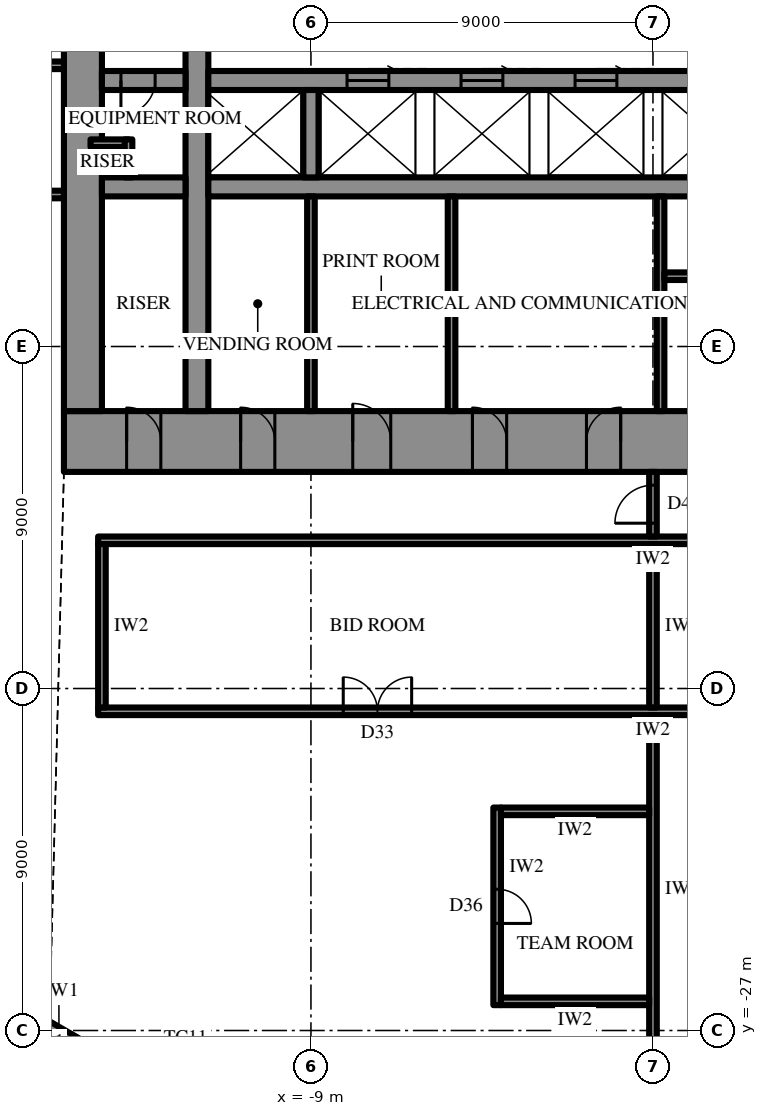
"""IFC4 building model, lengths in metres.
Left out: names, types, materials, properties, quantities, classifications, styles, units other than length and angle.
Written with IfcOpenShell. Run it as: python <this file> out.ifc"""

import sys

from ifc_helpers import new_model, si_unit, direction, frame, frame_2d, origin, place, context, subcontext, project, spatial, rectangle, extrude, element, fill, save


model = new_model("IFC4")
c1 = context("Model", 3, precision=1e-05, world=origin(), true_north=direction((0.0, 1.0)))
c2 = subcontext(c1, "Body", "Model", "MODEL_VIEW")
j1 = project(units=[si_unit("LENGTHUNIT", "METRE"), si_unit("PLANEANGLEUNIT", "RADIAN")], contexts=[c1])
p1 = place(None, origin())
s1 = spatial("IfcSite", under=j1, at=p1, CompositionType="ELEMENT")
p2 = place(p1, origin())
s2 = spatial("IfcBuilding", under=s1, at=p2, CompositionType="ELEMENT")
p3 = place(p2, frame((0.0, 0.0, 261.7)))
s3 = spatial("IfcBuildingStorey", under=s2, at=p3, CompositionType="ELEMENT", Elevation=261.7)
p4 = place(p3, frame((15.5, -11.5, 0.0), z_axis=(0.0, 0.0, 1.0), x_axis=(-1.0, 0.0, 0.0)))
e1 = element("IfcWall", 1, at=p4, inside=s3, PredefinedType="SHEAR", context=c2, shape_type="SweptSolid", body=[
    extrude(rectangle(XDim=31.0, YDim=1.6, at=frame_2d((15.5, 0.0))), origin(), (0.0, 0.0, 1.0), 4.2),
])
p5 = place(p4, frame((16.35, 0.0, 0.0)))
e2 = element("IfcOpeningElement", 2, at=p5, cuts=e1, PredefinedType="OPENING", context=c2, shape_type="SweptSolid", body=[
    extrude(rectangle(XDim=0.9, YDim=2.2, at=frame_2d((0.45, 1.1))), frame((0.0, 0.81, 0.0), z_axis=(0.0, -1.0, 0.0), x_axis=(1.0, 0.0, 0.0)), (0.0, 0.0, 1.0), 1.62),
])
p6 = place(p4, frame((19.35, 0.0, 0.0)))
e3 = element("IfcOpeningElement", 3, at=p6, cuts=e1, PredefinedType="OPENING", context=c2, shape_type="SweptSolid", body=[
    extrude(rectangle(XDim=0.9, YDim=2.2, at=frame_2d((0.45, 1.1))), frame((0.0, 0.81, 0.0), z_axis=(0.0, -1.0, 0.0), x_axis=(1.0, 0.0, 0.0)), (0.0, 0.0, 1.0), 1.62),
])
p7 = place(p4, frame((22.4, 0.0, 0.0)))
e4 = element("IfcOpeningElement", 4, at=p7, cuts=e1, PredefinedType="OPENING", context=c2, shape_type="SweptSolid", body=[
    extrude(rectangle(XDim=1.0, YDim=2.2, at=frame_2d((0.5, 1.1))), frame((0.0, 0.81, 0.0), z_axis=(0.0, -1.0, 0.0), x_axis=(1.0, 0.0, 0.0)), (0.0, 0.0, 1.0), 1.62),
])
p8 = place(p4, frame((1.65, 0.0, 0.0)))
e5 = element("IfcOpeningElement", 5, at=p8, cuts=e1, PredefinedType="OPENING", context=c2, shape_type="SweptSolid", body=[
    extrude(rectangle(XDim=0.9, YDim=2.2, at=frame_2d((0.45, 1.1))), frame((0.0, 0.81, 0.0), z_axis=(0.0, -1.0, 0.0), x_axis=(1.0, 0.0, 0.0)), (0.0, 0.0, 1.0), 1.62),
])
p9 = place(p4, frame((4.65, 0.0, 0.0)))
e6 = element("IfcOpeningElement", 6, at=p9, cuts=e1, PredefinedType="OPENING", context=c2, shape_type="SweptSolid", body=[
    extrude(rectangle(XDim=0.9, YDim=2.2, at=frame_2d((0.45, 1.1))), frame((0.0, 0.81, 0.0), z_axis=(0.0, -1.0, 0.0), x_axis=(1.0, 0.0, 0.0)), (0.0, 0.0, 1.0), 1.62),
])
p10 = place(p4, frame((25.45, 0.0, 0.0)))
e7 = element("IfcOpeningElement", 7, at=p10, cuts=e1, PredefinedType="OPENING", context=c2, shape_type="SweptSolid", body=[
    extrude(rectangle(XDim=0.9, YDim=2.2, at=frame_2d((0.45, 1.1))), frame((0.0, 0.81, 0.0), z_axis=(0.0, -1.0, 0.0), x_axis=(1.0, 0.0, 0.0)), (0.0, 0.0, 1.0), 1.62),
])
p11 = place(p4, frame((28.45, 0.0, 0.0)))
e8 = element("IfcOpeningElement", 8, at=p11, cuts=e1, PredefinedType="OPENING", context=c2, shape_type="SweptSolid", body=[
    extrude(rectangle(XDim=0.9, YDim=2.2, at=frame_2d((0.45, 1.1))), frame((0.0, 0.81, 0.0), z_axis=(0.0, -1.0, 0.0), x_axis=(1.0, 0.0, 0.0)), (0.0, 0.0, 1.0), 1.62),
])
p12 = place(p3, frame((-15.0, 10.7, 0.0), z_axis=(0.0, 0.0, 1.0), x_axis=(0.0, -1.0, 0.0)))
e9 = element("IfcWall", 9, at=p12, inside=s3, PredefinedType="SHEAR", context=c2, shape_type="SweptSolid", body=[
    extrude(rectangle(XDim=21.4, YDim=1.0, at=frame_2d((10.7, 0.0))), origin(), (0.0, 0.0, 1.0), 4.2),
])
p13 = place(p12, frame((9.8, 0.0, 0.0)))
e10 = element("IfcOpeningElement", 10, at=p13, cuts=e9, PredefinedType="OPENING", context=c2, shape_type="SweptSolid", body=[
    extrude(rectangle(XDim=1.8, YDim=2.4, at=frame_2d((0.9, 1.2))), frame((0.0, 0.51, 0.0), z_axis=(0.0, -1.0, 0.0), x_axis=(1.0, 0.0, 0.0)), (0.0, 0.0, 1.0), 1.02),
])
p14 = place(p3, frame((-12.0, -10.7, 0.0), z_axis=(0.0, 0.0, 1.0), x_axis=(0.0, 1.0, 0.0)))
e11 = element("IfcWall", 11, at=p14, inside=s3, PredefinedType="SHEAR", context=c2, shape_type="SweptSolid", body=[
    extrude(rectangle(XDim=21.4, YDim=0.6, at=frame_2d((10.7, 0.0))), origin(), (0.0, 0.0, 1.0), 4.2),
])
p15 = place(p14, frame((9.8, 0.0, 0.0)))
e12 = element("IfcOpeningElement", 12, at=p15, cuts=e11, PredefinedType="OPENING", context=c2, shape_type="SweptSolid", body=[
    extrude(rectangle(XDim=1.8, YDim=2.4, at=frame_2d((0.9, 1.2))), frame((0.0, 0.31, 0.0), z_axis=(0.0, -1.0, 0.0), x_axis=(1.0, 0.0, 0.0)), (0.0, 0.0, 1.0), 0.62),
])
p16 = place(p3, frame((3.2, -2.0, 0.0), z_axis=(0.0, 0.0, 1.0), x_axis=(-1.0, 0.0, 0.0)))
e13 = element("IfcWall", 13, at=p16, inside=s3, PredefinedType="SHEAR", context=c2, shape_type="SweptSolid", body=[
    extrude(rectangle(XDim=14.9, YDim=0.5, at=frame_2d((7.45, 0.0))), origin(), (0.0, 0.0, 1.0), 4.2),
])
p17 = place(p16, frame((1.15, 0.0, 0.0)))
e14 = element("IfcOpeningElement", 14, at=p17, cuts=e13, PredefinedType="OPENING", context=c2, shape_type="SweptSolid", body=[
    extrude(rectangle(XDim=1.1, YDim=2.2, at=frame_2d((0.55, 1.1))), frame((0.0, 0.26, 0.0), z_axis=(0.0, -1.0, 0.0), x_axis=(1.0, 0.0, 0.0)), (0.0, 0.0, 1.0), 0.52),
])
p18 = place(p16, frame((4.15, 0.0, 0.0)))
e15 = element("IfcOpeningElement", 15, at=p18, cuts=e13, PredefinedType="OPENING", context=c2, shape_type="SweptSolid", body=[
    extrude(rectangle(XDim=1.1, YDim=2.2, at=frame_2d((0.55, 1.1))), frame((0.0, 0.26, 0.0), z_axis=(0.0, -1.0, 0.0), x_axis=(1.0, 0.0, 0.0)), (0.0, 0.0, 1.0), 0.52),
])
p19 = place(p16, frame((7.15, 0.0, 0.0)))
e16 = element("IfcOpeningElement", 16, at=p19, cuts=e13, PredefinedType="OPENING", context=c2, shape_type="SweptSolid", body=[
    extrude(rectangle(XDim=1.1, YDim=2.2, at=frame_2d((0.55, 1.1))), frame((0.0, 0.26, 0.0), z_axis=(0.0, -1.0, 0.0), x_axis=(1.0, 0.0, 0.0)), (0.0, 0.0, 1.0), 0.52),
])
p20 = place(p16, frame((10.15, 0.0, 0.0)))
e17 = element("IfcOpeningElement", 17, at=p20, cuts=e13, PredefinedType="OPENING", context=c2, shape_type="SweptSolid", body=[
    extrude(rectangle(XDim=1.1, YDim=2.2, at=frame_2d((0.55, 1.1))), frame((0.0, 0.26, 0.0), z_axis=(0.0, -1.0, 0.0), x_axis=(1.0, 0.0, 0.0)), (0.0, 0.0, 1.0), 0.52),
])
p21 = place(p3, frame((-12.3, -2.0, 0.0), z_axis=(0.0, 0.0, 1.0), x_axis=(-1.0, 0.0, 0.0)))
e18 = element("IfcWall", 18, at=p21, inside=s3, PredefinedType="SHEAR", context=c2, shape_type="SweptSolid", body=[
    extrude(rectangle(XDim=2.2, YDim=0.5, at=frame_2d((1.1, 0.0))), origin(), (0.0, 0.0, 1.0), 4.2),
])
p22 = place(p21, frame((0.8, 0.0, 0.0)))
e19 = element("IfcOpeningElement", 19, at=p22, cuts=e18, PredefinedType="OPENING", context=c2, shape_type="SweptSolid", body=[
    extrude(rectangle(XDim=0.9, YDim=2.2, at=frame_2d((0.45, 1.1))), frame((0.0, 0.26, 0.0), z_axis=(0.0, -1.0, 0.0), x_axis=(1.0, 0.0, 0.0)), (0.0, 0.0, 1.0), 0.52),
])
p23 = place(p3, frame((11.7, -4.8, 0.0), z_axis=(0.0, 0.0, 1.0), x_axis=(-1.0, 0.0, 0.0)))
e20 = element("IfcWall", 20, at=p23, inside=s3, PredefinedType="SHEAR", context=c2, shape_type="SweptSolid", body=[
    extrude(rectangle(XDim=23.4, YDim=0.5, at=frame_2d((11.7, 0.0))), origin(), (0.0, 0.0, 1.0), 4.2),
])
p24 = place(p23, frame((6.6, 0.0, 0.0)))
e21 = element("IfcOpeningElement", 21, at=p24, cuts=e20, PredefinedType="OPENING", context=c2, shape_type="SweptSolid", body=[
    extrude(rectangle(XDim=1.2, YDim=2.2, at=frame_2d((0.6, 1.1))), frame((0.0, 0.26, 0.0), z_axis=(0.0, -1.0, 0.0), x_axis=(1.0, 0.0, 0.0)), (0.0, 0.0, 1.0), 0.52),
])
p25 = place(p23, frame((3.6, 0.0, 0.0)))
e22 = element("IfcOpeningElement", 22, at=p25, cuts=e20, PredefinedType="OPENING", context=c2, shape_type="SweptSolid", body=[
    extrude(rectangle(XDim=1.2, YDim=2.2, at=frame_2d((0.6, 1.1))), frame((0.0, 0.26, 0.0), z_axis=(0.0, -1.0, 0.0), x_axis=(1.0, 0.0, 0.0)), (0.0, 0.0, 1.0), 0.52),
])
p26 = place(p3, frame((-12.3, -4.8, 0.0), z_axis=(0.0, 0.0, 1.0), x_axis=(-1.0, 0.0, 0.0)))
e23 = element("IfcWall", 23, at=p26, inside=s3, PredefinedType="SHEAR", context=c2, shape_type="SweptSolid", body=[
    extrude(rectangle(XDim=2.2, YDim=0.5, at=frame_2d((1.1, 0.0))), origin(), (0.0, 0.0, 1.0), 4.2),
])
p27 = place(p3, frame((-9.0, -2.25, 0.0), z_axis=(0.0, 0.0, 1.0), x_axis=(0.0, -1.0, 0.0)))
e24 = element("IfcWall", 24, at=p27, inside=s3, PredefinedType="SHEAR", context=c2, shape_type="SweptSolid", body=[
    extrude(rectangle(XDim=2.3, YDim=0.4, at=frame_2d((1.15, 0.0))), origin(), (0.0, 0.0, 1.0), 4.2),
])
p28 = place(p3, frame((0.2, -5.05, 0.0), z_axis=(0.0, 0.0, 1.0), x_axis=(0.0, -1.0, 0.0)))
e25 = element("IfcWall", 25, at=p28, inside=s3, PredefinedType="SHEAR", context=c2, shape_type="SweptSolid", body=[
    extrude(rectangle(XDim=5.65, YDim=0.2, at=frame_2d((2.825, 0.0))), origin(), (0.0, 0.0, 1.0), 4.2),
])
p29 = place(p3, frame((8.9, -7.15, 0.0), z_axis=(0.0, 0.0, 1.0), x_axis=(-1.0, 0.0, 0.0)))
e26 = element("IfcWall", 26, at=p29, inside=s3, PredefinedType="SHEAR", context=c2, shape_type="SweptSolid", body=[
    extrude(rectangle(XDim=8.6, YDim=0.2, at=frame_2d((4.3, 0.0))), origin(), (0.0, 0.0, 1.0), 4.2),
])
p30 = place(p29, frame((0.3, 0.0, 0.0)))
e27 = element("IfcOpeningElement", 27, at=p30, cuts=e26, PredefinedType="OPENING", context=c2, shape_type="SweptSolid", body=[
    extrude(rectangle(XDim=1.0, YDim=2.2, at=frame_2d((0.5, 1.1))), frame((0.0, 0.11, 0.0), z_axis=(0.0, -1.0, 0.0), x_axis=(1.0, 0.0, 0.0)), (0.0, 0.0, 1.0), 0.22),
])
p31 = place(p3, frame((-18.707, -25.299, 0.0), z_axis=(0.0, 0.0, 1.0), x_axis=(0.866010973379, -0.500024993363, 0.0)))
e28 = element("IfcWall", 28, at=p31, inside=s3, PredefinedType="SOLIDWALL", context=c2, shape_type="SweptSolid", body=[
    extrude(rectangle(XDim=7.102, YDim=0.3, at=frame_2d((3.551, 0.0))), origin(), (0.0, 0.0, 1.0), 2.8),
])
for number, where, z_axis, x_axis in (
    (29, (-9.0, -5.05, 0.0), (0.0, 0.0, 1.0), (0.0, -1.0, 0.0)),
    (30, (-5.3, -5.05, 0.0), (0.0, 0.0, 1.0), (0.0, -1.0, 0.0)),
):
    element("IfcWall", number, at=place(p3, frame(where, z_axis=z_axis, x_axis=x_axis)), inside=s3, PredefinedType="PARTITIONING", context=c2, shape_type="SweptSolid", body=[
        extrude(rectangle(XDim=5.65, YDim=0.2, at=frame_2d((2.825, 0.0))), origin(), (0.0, 0.0, 1.0), 4.0),
    ])
for number, where, z_axis, x_axis in (
    (31, (-13.8, -3.65, 0.0), (0.0, 0.0, 1.0), (-1.0, 0.0, 0.0)),
    (32, (-13.8, -3.55, 0.0), (0.0, 0.0, 1.0), (0.0, -1.0, 0.0)),
):
    element("IfcWall", number, at=place(p3, frame(where, z_axis=z_axis, x_axis=x_axis)), inside=s3, PredefinedType="PARTITIONING", context=c2, shape_type="SweptSolid", body=[
        extrude(rectangle(XDim=1.0, YDim=0.2, at=frame_2d((0.5, 0.0))), origin(), (0.0, 0.0, 1.0), 4.0),
    ])
p32 = place(p3, frame((14.6, -14.1, 0.0), z_axis=(0.0, 0.0, 1.0), x_axis=(-1.0, 0.0, 0.0)))
e33 = element("IfcWall", 33, at=p32, inside=s3, PredefinedType="PARTITIONING", context=c2, shape_type="SweptSolid", body=[
    extrude(rectangle(XDim=29.2, YDim=0.2, at=frame_2d((14.6, 0.0))), origin(), (0.0, 0.0, 1.0), 4.0),
])
p33 = place(p3, frame((14.6, -18.6, 0.0), z_axis=(0.0, 0.0, 1.0), x_axis=(-1.0, 0.0, 0.0)))
e34 = element("IfcWall", 34, at=p33, inside=s3, PredefinedType="PARTITIONING", context=c2, shape_type="SweptSolid", body=[
    extrude(rectangle(XDim=29.2, YDim=0.2, at=frame_2d((14.6, 0.0))), origin(), (0.0, 0.0, 1.0), 4.0),
])
p34 = place(p33, frame((6.45, 0.0, 0.0)))
e35 = element("IfcOpeningElement", 35, at=p34, cuts=e34, PredefinedType="OPENING", context=c2, shape_type="SweptSolid", body=[
    extrude(rectangle(XDim=1.8, YDim=2.4, at=frame_2d((0.9, 1.2))), frame((0.0, 0.11, 0.0), z_axis=(0.0, -1.0, 0.0), x_axis=(1.0, 0.0, 0.0)), (0.0, 0.0, 1.0), 0.22),
])
p35 = place(p33, frame((20.95, 0.0, 0.0)))
e36 = element("IfcOpeningElement", 36, at=p35, cuts=e34, PredefinedType="OPENING", context=c2, shape_type="SweptSolid", body=[
    extrude(rectangle(XDim=1.8, YDim=2.4, at=frame_2d((0.9, 1.2))), frame((0.0, 0.11, 0.0), z_axis=(0.0, -1.0, 0.0), x_axis=(1.0, 0.0, 0.0)), (0.0, 0.0, 1.0), 0.22),
])
p36 = place(p3, frame((0.0, -14.2, 0.0), z_axis=(0.0, 0.0, 1.0), x_axis=(0.0, -1.0, 0.0)))
e37 = element("IfcWall", 37, at=p36, inside=s3, PredefinedType="PARTITIONING", context=c2, shape_type="SweptSolid", body=[
    extrude(rectangle(XDim=4.3, YDim=0.2, at=frame_2d((2.15, 0.0))), origin(), (0.0, 0.0, 1.0), 2.992),
])
p37 = place(p3, frame((-14.5, -14.2, 0.0), z_axis=(0.0, 0.0, 1.0), x_axis=(0.0, -1.0, 0.0)))
e38 = element("IfcWall", 38, at=p37, inside=s3, PredefinedType="PARTITIONING", context=c2, shape_type="SweptSolid", body=[
    extrude(rectangle(XDim=4.3, YDim=0.2, at=frame_2d((2.15, 0.0))), origin(), (0.0, 0.0, 1.0), 4.0),
])
p38 = place(p3, frame((-15.5, -1.6, 0.0), z_axis=(0.0, 0.0, 1.0), x_axis=(-1.0, 0.0, 0.0)))
e39 = element("IfcWall", 39, at=p38, inside=s3, PredefinedType="PARTITIONING", context=c2, shape_type="SweptSolid", body=[
    extrude(rectangle(XDim=11.7, YDim=0.2, at=frame_2d((5.85, 0.0))), origin(), (0.0, 0.0, 1.0), 4.0),
])
p39 = place(p38, frame((3.01, 0.0, 0.0)))
e40 = element("IfcOpeningElement", 40, at=p39, cuts=e39, PredefinedType="OPENING", context=c2, shape_type="SweptSolid", body=[
    extrude(rectangle(XDim=1.0, YDim=2.2, at=frame_2d((0.5, 1.1))), frame((0.0, 0.11, 0.0), z_axis=(0.0, -1.0, 0.0), x_axis=(1.0, 0.0, 0.0)), (0.0, 0.0, 1.0), 0.22),
])
p40 = place(p3, frame((0.0, -12.3, 0.0), z_axis=(0.0, 0.0, 1.0), x_axis=(0.0, -1.0, 0.0)))
e41 = element("IfcWall", 41, at=p40, inside=s3, PredefinedType="PARTITIONING", context=c2, shape_type="SweptSolid", body=[
    extrude(rectangle(XDim=1.7, YDim=0.2, at=frame_2d((0.85, 0.0))), origin(), (0.0, 0.0, 1.0), 2.992),
])
p41 = place(p40, frame((0.35, 0.0, 0.0)))
e42 = element("IfcOpeningElement", 42, at=p41, cuts=e41, PredefinedType="OPENING", context=c2, shape_type="SweptSolid", body=[
    extrude(rectangle(XDim=1.0, YDim=2.2, at=frame_2d((0.5, 1.1))), frame((0.0, 0.11, 0.0), z_axis=(0.0, -1.0, 0.0), x_axis=(1.0, 0.0, 0.0)), (0.0, 0.0, 1.0), 0.22),
])
p42 = place(p3, frame((0.0, -18.7, 0.0), z_axis=(0.0, 0.0, 1.0), x_axis=(0.0, -1.0, 0.0)))
e43 = element("IfcWall", 43, at=p42, inside=s3, PredefinedType="PARTITIONING", context=c2, shape_type="SweptSolid", body=[
    extrude(rectangle(XDim=9.15, YDim=0.2, at=frame_2d((4.575, 0.0))), origin(), (0.0, 0.0, 1.0), 2.992),
])
p43 = place(p3, frame((-15.5, -5.0, 0.0), z_axis=(0.0, 0.0, 1.0), x_axis=(-1.0, 0.0, 0.0)))
e44 = element("IfcWall", 44, at=p43, inside=s3, PredefinedType="PARTITIONING", context=c2, shape_type="SweptSolid", body=[
    extrude(rectangle(XDim=14.845, YDim=0.2, at=frame_2d((7.423, 0.0))), origin(), (0.0, 0.0, 1.0), 4.0),
])
p44 = place(p43, frame((0.985, 0.0, 0.0)))
e45 = element("IfcOpeningElement", 45, at=p44, cuts=e44, PredefinedType="OPENING", context=c2, shape_type="SweptSolid", body=[
    extrude(rectangle(XDim=1.0, YDim=2.2, at=frame_2d((0.5, 1.1))), frame((0.0, 0.11, 0.0), z_axis=(0.0, -1.0, 0.0), x_axis=(1.0, 0.0, 0.0)), (0.0, 0.0, 1.0), 0.22),
])
p45 = place(p3, frame((-4.1, -21.133, 0.0), z_axis=(0.0, 0.0, 1.0), x_axis=(0.0, -1.0, 0.0)))
e46 = element("IfcWall", 46, at=p45, inside=s3, PredefinedType="PARTITIONING", context=c2, shape_type="SweptSolid", body=[
    extrude(rectangle(XDim=5.2, YDim=0.2, at=frame_2d((2.6, 0.0))), origin(), (0.0, 0.0, 1.0), 4.0),
])
p46 = place(p45, frame((2.15, 0.0, 0.0)))
e47 = element("IfcOpeningElement", 47, at=p46, cuts=e46, PredefinedType="OPENING", context=c2, shape_type="SweptSolid", body=[
    extrude(rectangle(XDim=0.9, YDim=2.2, at=frame_2d((0.45, 1.1))), frame((0.0, 0.11, 0.0), z_axis=(0.0, -1.0, 0.0), x_axis=(1.0, 0.0, 0.0)), (0.0, 0.0, 1.0), 0.22),
])
for number, where, z_axis, x_axis in (
    (48, (-0.1, -21.232, 0.0), (0.0, 0.0, 1.0), (-1.0, 0.0, 0.0)),
    (49, (-0.1, -26.232, 0.0), (0.0, 0.0, 1.0), (-1.0, 0.0, 0.0)),
):
    element("IfcWall", number, at=place(p3, frame(where, z_axis=z_axis, x_axis=x_axis)), inside=s3, PredefinedType="PARTITIONING", context=c2, shape_type="SweptSolid", body=[
        extrude(rectangle(XDim=3.9, YDim=0.2, at=frame_2d((1.95, 0.0))), origin(), (0.0, 0.0, 1.0), 4.0),
    ])
p47 = place(p5, frame((0.9, 0.0, 0.0), z_axis=(0.0, 0.0, 1.0), x_axis=(-1.0, 0.0, 0.0)))
e50 = element("IfcDoor", 50, at=p47, inside=s3, OperationType="SINGLE_SWING_LEFT", PredefinedType="DOOR", context=c2, shape_type="SweptSolid", body=[
    extrude(rectangle(XDim=0.9, YDim=2.2, at=frame_2d((0.45, 1.1))), frame((0.0, 0.025, 0.0), z_axis=(0.0, -1.0, 0.0), x_axis=(1.0, 0.0, 0.0)), (0.0, 0.0, 1.0), 0.05),
])
fill(e2, e50)
p48 = place(p6, frame((0.9, 0.0, 0.0), z_axis=(0.0, 0.0, 1.0), x_axis=(-1.0, 0.0, 0.0)))
e51 = element("IfcDoor", 51, at=p48, inside=s3, OperationType="SINGLE_SWING_RIGHT", PredefinedType="DOOR", context=c2, shape_type="SweptSolid", body=[
    extrude(rectangle(XDim=0.9, YDim=2.2, at=frame_2d((0.45, 1.1))), frame((0.0, 0.025, 0.0), z_axis=(0.0, -1.0, 0.0), x_axis=(1.0, 0.0, 0.0)), (0.0, 0.0, 1.0), 0.05),
])
fill(e3, e51)
p49 = place(p7, frame((1.0, 0.0, 0.0), z_axis=(0.0, 0.0, 1.0), x_axis=(-1.0, 0.0, 0.0)))
e52 = element("IfcDoor", 52, at=p49, inside=s3, OperationType="SINGLE_SWING_RIGHT", PredefinedType="DOOR", context=c2, shape_type="SweptSolid", body=[
    extrude(rectangle(XDim=1.0, YDim=2.2, at=frame_2d((0.5, 1.1))), frame((0.0, 0.025, 0.0), z_axis=(0.0, -1.0, 0.0), x_axis=(1.0, 0.0, 0.0)), (0.0, 0.0, 1.0), 0.05),
])
fill(e4, e52)
p50 = place(p10, frame((0.9, 0.0, 0.0), z_axis=(0.0, 0.0, 1.0), x_axis=(-1.0, 0.0, 0.0)))
e53 = element("IfcDoor", 53, at=p50, inside=s3, OperationType="SINGLE_SWING_RIGHT", PredefinedType="DOOR", context=c2, shape_type="SweptSolid", body=[
    extrude(rectangle(XDim=0.9, YDim=2.2, at=frame_2d((0.45, 1.1))), frame((0.0, 0.025, 0.0), z_axis=(0.0, -1.0, 0.0), x_axis=(1.0, 0.0, 0.0)), (0.0, 0.0, 1.0), 0.05),
])
fill(e7, e53)
p51 = place(p11, frame((0.9, 0.0, 0.0), z_axis=(0.0, 0.0, 1.0), x_axis=(-1.0, 0.0, 0.0)))
e54 = element("IfcDoor", 54, at=p51, inside=s3, OperationType="SINGLE_SWING_RIGHT", PredefinedType="DOOR", context=c2, shape_type="SweptSolid", body=[
    extrude(rectangle(XDim=0.9, YDim=2.2, at=frame_2d((0.45, 1.1))), frame((0.0, 0.025, 0.0), z_axis=(0.0, -1.0, 0.0), x_axis=(1.0, 0.0, 0.0)), (0.0, 0.0, 1.0), 0.05),
])
fill(e8, e54)
p52 = place(p22, origin())
e55 = element("IfcDoor", 55, at=p52, inside=s3, OperationType="SINGLE_SWING_LEFT", PredefinedType="DOOR", context=c2, shape_type="SweptSolid", body=[
    extrude(rectangle(XDim=0.9, YDim=2.2, at=frame_2d((0.45, 1.1))), frame((0.0, 0.025, 0.0), z_axis=(0.0, -1.0, 0.0), x_axis=(1.0, 0.0, 0.0)), (0.0, 0.0, 1.0), 0.05),
])
fill(e19, e55)
p53 = place(p18, frame((1.1, 0.0, 0.0), z_axis=(0.0, 0.0, 1.0), x_axis=(-1.0, 0.0, 0.0)))
e56 = element("IfcDoor", 56, at=p53, inside=s3, OperationType="SLIDING_TO_LEFT", PredefinedType="DOOR", context=c2, shape_type="SweptSolid", body=[
    extrude(rectangle(XDim=1.1, YDim=2.2, at=frame_2d((0.55, 1.1))), frame((0.0, 0.025, 0.0), z_axis=(0.0, -1.0, 0.0), x_axis=(1.0, 0.0, 0.0)), (0.0, 0.0, 1.0), 0.05),
])
fill(e15, e56)
p54 = place(p19, frame((1.1, 0.0, 0.0), z_axis=(0.0, 0.0, 1.0), x_axis=(-1.0, 0.0, 0.0)))
e57 = element("IfcDoor", 57, at=p54, inside=s3, OperationType="SLIDING_TO_LEFT", PredefinedType="DOOR", context=c2, shape_type="SweptSolid", body=[
    extrude(rectangle(XDim=1.1, YDim=2.2, at=frame_2d((0.55, 1.1))), frame((0.0, 0.025, 0.0), z_axis=(0.0, -1.0, 0.0), x_axis=(1.0, 0.0, 0.0)), (0.0, 0.0, 1.0), 0.05),
])
fill(e16, e57)
p55 = place(p20, frame((1.1, 0.0, 0.0), z_axis=(0.0, 0.0, 1.0), x_axis=(-1.0, 0.0, 0.0)))
e58 = element("IfcDoor", 58, at=p55, inside=s3, OperationType="SLIDING_TO_LEFT", PredefinedType="DOOR", context=c2, shape_type="SweptSolid", body=[
    extrude(rectangle(XDim=1.1, YDim=2.2, at=frame_2d((0.55, 1.1))), frame((0.0, 0.025, 0.0), z_axis=(0.0, -1.0, 0.0), x_axis=(1.0, 0.0, 0.0)), (0.0, 0.0, 1.0), 0.05),
])
fill(e17, e58)
p56 = place(p35, frame((1.8, 0.0, 0.0), z_axis=(0.0, 0.0, 1.0), x_axis=(-1.0, 0.0, 0.0)))
e59 = element("IfcDoor", 59, at=p56, inside=s3, OperationType="DOUBLE_DOOR_SINGLE_SWING", PredefinedType="DOOR", context=c2, shape_type="SweptSolid", body=[
    extrude(rectangle(XDim=1.8, YDim=2.4, at=frame_2d((0.9, 1.2))), frame((0.0, 0.025, 0.0), z_axis=(0.0, -1.0, 0.0), x_axis=(1.0, 0.0, 0.0)), (0.0, 0.0, 1.0), 0.05),
])
fill(e36, e59)
p57 = place(p41, frame((1.0, 0.0, 0.0), z_axis=(0.0, 0.0, 1.0), x_axis=(-1.0, 0.0, 0.0)))
e60 = element("IfcDoor", 60, at=p57, inside=s3, OperationType="SINGLE_SWING_RIGHT", PredefinedType="DOOR", context=c2, shape_type="SweptSolid", body=[
    extrude(rectangle(XDim=1.0, YDim=2.2, at=frame_2d((0.5, 1.1))), frame((0.0, 0.025, 0.0), z_axis=(0.0, -1.0, 0.0), x_axis=(1.0, 0.0, 0.0)), (0.0, 0.0, 1.0), 0.05),
])
fill(e42, e60)
p58 = place(p46, origin())
e61 = element("IfcDoor", 61, at=p58, inside=s3, OperationType="SINGLE_SWING_LEFT", PredefinedType="DOOR", context=c2, shape_type="SweptSolid", body=[
    extrude(rectangle(XDim=0.9, YDim=2.2, at=frame_2d((0.45, 1.1))), frame((0.0, 0.025, 0.0), z_axis=(0.0, -1.0, 0.0), x_axis=(1.0, 0.0, 0.0)), (0.0, 0.0, 1.0), 0.05),
])
fill(e47, e61)
save(model, sys.argv[1])
